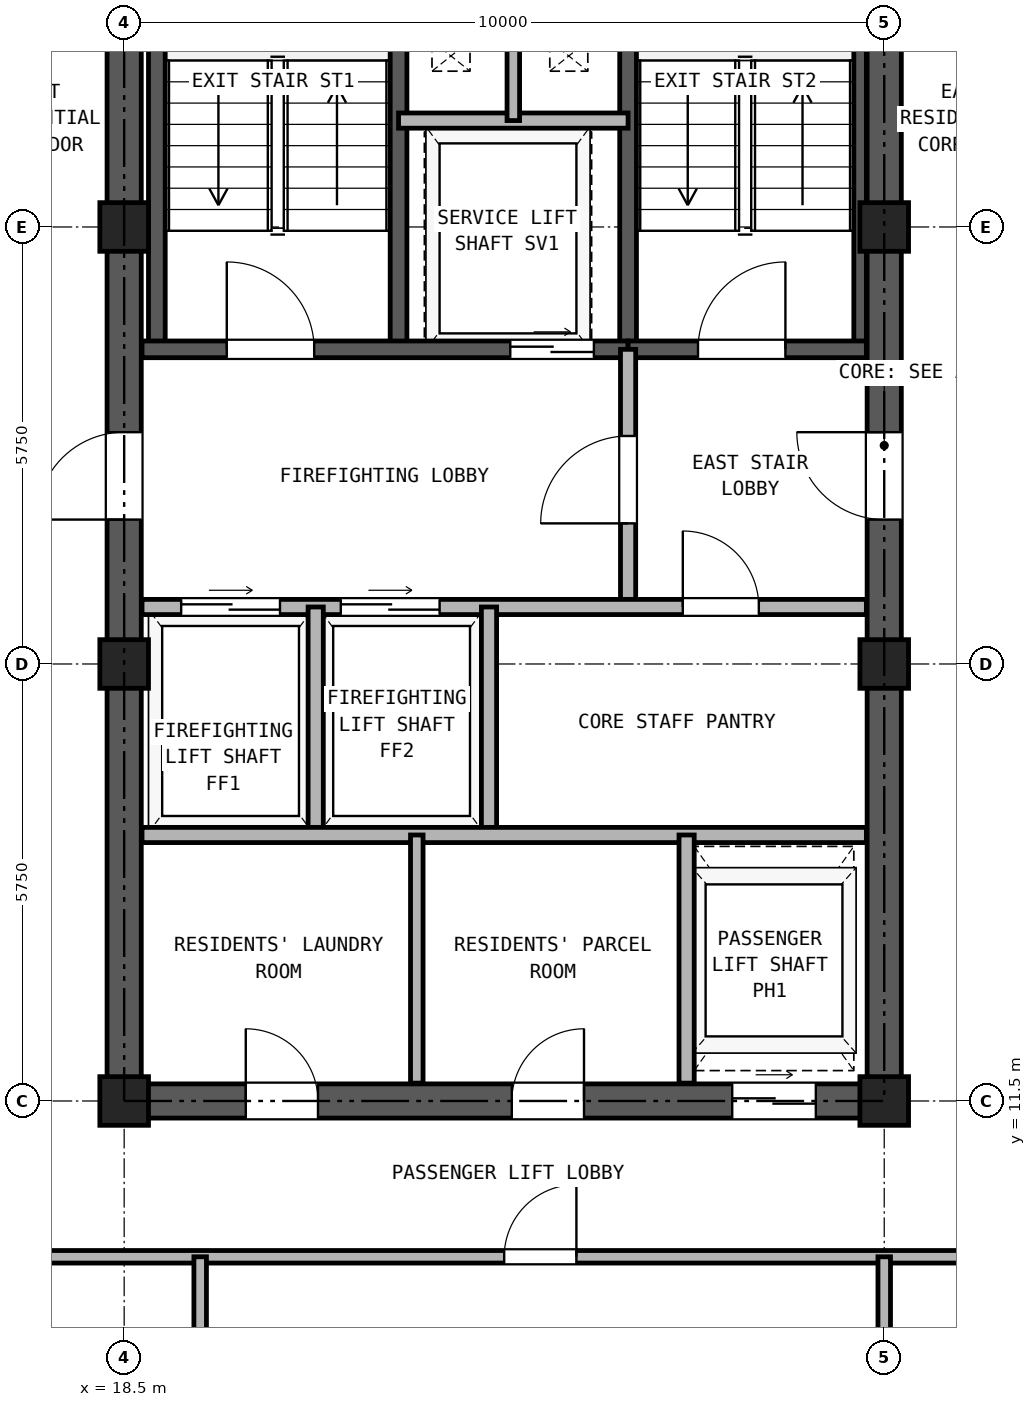
"""IFC4 building model, lengths in metres.
Left out: names, types, materials, properties, quantities, classifications, styles, units other than length and angle.
Written with IfcOpenShell. Run it as: python <this file> out.ifc"""

import sys

from ifc_helpers import new_model, si_unit, direction, frame, frame_2d, origin, origin_2d, place, context, subcontext, project, spatial, rectangle, hollow_rectangle, extrude, source, transform, mapped, element, fill, save


model = new_model("IFC4")
c1 = context("Model", 3, precision=1e-05, world=origin(), true_north=direction((0.0, 1.0)))
c2 = subcontext(c1, "Body", "Model", "MODEL_VIEW")
j1 = project(units=[si_unit("LENGTHUNIT", "METRE"), si_unit("PLANEANGLEUNIT", "RADIAN")], contexts=[c1])
p1 = place(None, origin())
s1 = spatial("IfcSite", under=j1, at=p1, CompositionType="ELEMENT")
p2 = place(p1, origin())
s2 = spatial("IfcBuilding", under=s1, at=p2, CompositionType="ELEMENT")
p3 = place(p2, frame((0.0, 0.0, 168.9)))
s3 = spatial("IfcBuildingStorey", under=s2, at=p3, CompositionType="ELEMENT", Elevation=168.9)
m1 = source(origin(), c2, "Body", "SweptSolid", [
    extrude(hollow_rectangle(XDim=0.64, YDim=0.64, WallThickness=0.035, at=origin_2d()), origin(), (0.0, 0.0, 1.0), 2.95),
])
for number, where, z_axis, x_axis in (
    (1, (18.5, 11.5, 0.0), (0.0, 0.0, 1.0), (1.0, 0.0, 0.0)),
    (2, (18.5, 17.25, 0.0), (0.0, 0.0, 1.0), (1.0, 0.0, 0.0)),
    (3, (18.5, 23.0, 0.0), (0.0, 0.0, 1.0), (1.0, 0.0, 0.0)),
    (4, (28.5, 11.5, 0.0), (0.0, 0.0, 1.0), (1.0, 0.0, 0.0)),
    (5, (28.5, 17.25, 0.0), (0.0, 0.0, 1.0), (1.0, 0.0, 0.0)),
    (6, (28.5, 23.0, 0.0), (0.0, 0.0, 1.0), (1.0, 0.0, 0.0)),
):
    element("IfcColumn", number, at=place(p3, frame(where, z_axis=z_axis, x_axis=x_axis)), inside=s3, PredefinedType="COLUMN", context=c2, shape_type="MappedRepresentation", body=[
        mapped(m1, transform((0.0, 0.0, 0.0), x_axis=(1.0, 0.0, 0.0), y_axis=(0.0, 1.0, 0.0), z_axis=(0.0, 0.0, 1.0), scale=1.0)),
    ])
p4 = place(p3, frame((18.275, 11.5, 0.0), z_axis=(0.0, 0.0, 1.0), x_axis=(1.0, 0.0, 0.0)))
e7 = element("IfcWall", 7, at=p4, inside=s3, PredefinedType="SHEAR", context=c2, shape_type="SweptSolid", body=[
    extrude(rectangle(XDim=10.45, YDim=0.45, at=frame_2d((5.225, 0.0))), origin(), (0.0, 0.0, 1.0), 2.95),
])
p5 = place(p4, frame((1.825, 0.0, 0.0)))
e8 = element("IfcOpeningElement", 8, at=p5, cuts=e7, PredefinedType="OPENING", context=c2, shape_type="SweptSolid", body=[
    extrude(rectangle(XDim=0.95, YDim=2.15, at=frame_2d((0.475, 1.075))), frame((0.0, 0.235, 0.0), z_axis=(0.0, -1.0, 0.0), x_axis=(1.0, 0.0, 0.0)), (0.0, 0.0, 1.0), 0.47),
])
p6 = place(p4, frame((5.325, 0.0, 0.0)))
e9 = element("IfcOpeningElement", 9, at=p6, cuts=e7, PredefinedType="OPENING", context=c2, shape_type="SweptSolid", body=[
    extrude(rectangle(XDim=0.95, YDim=2.15, at=frame_2d((0.475, 1.075))), frame((0.0, 0.235, 0.0), z_axis=(0.0, -1.0, 0.0), x_axis=(1.0, 0.0, 0.0)), (0.0, 0.0, 1.0), 0.47),
])
p7 = place(p4, frame((8.225, 0.0, 0.0)))
e10 = element("IfcOpeningElement", 10, at=p7, cuts=e7, PredefinedType="OPENING", context=c2, shape_type="SweptSolid", body=[
    extrude(rectangle(XDim=1.1, YDim=2.25, at=frame_2d((0.55, 1.125))), frame((0.0, 0.235, 0.0), z_axis=(0.0, -1.0, 0.0), x_axis=(1.0, 0.0, 0.0)), (0.0, 0.0, 1.0), 0.47),
])
p8 = place(p3, frame((18.5, 11.725, 0.0), z_axis=(0.0, 0.0, 1.0), x_axis=(0.0, 1.0, 0.0)))
e11 = element("IfcWall", 11, at=p8, inside=s3, PredefinedType="SHEAR", context=c2, shape_type="SweptSolid", body=[
    extrude(rectangle(XDim=16.8, YDim=0.45, at=frame_2d((8.4, 0.0))), origin(), (0.0, 0.0, 1.0), 2.95),
])
p9 = place(p8, frame((7.425, 0.0, 0.0)))
e12 = element("IfcOpeningElement", 12, at=p9, cuts=e11, PredefinedType="OPENING", context=c2, shape_type="SweptSolid", body=[
    extrude(rectangle(XDim=1.15, YDim=2.2, at=frame_2d((0.575, 1.1))), frame((0.0, 0.235, 0.0), z_axis=(0.0, -1.0, 0.0), x_axis=(1.0, 0.0, 0.0)), (0.0, 0.0, 1.0), 0.47),
])
p10 = place(p3, frame((28.5, 11.725, 0.0), z_axis=(0.0, 0.0, 1.0), x_axis=(0.0, 1.0, 0.0)))
e13 = element("IfcWall", 13, at=p10, inside=s3, PredefinedType="SHEAR", context=c2, shape_type="SweptSolid", body=[
    extrude(rectangle(XDim=16.8, YDim=0.45, at=frame_2d((8.4, 0.0))), origin(), (0.0, 0.0, 1.0), 2.95),
])
p11 = place(p10, frame((7.425, 0.0, 0.0)))
e14 = element("IfcOpeningElement", 14, at=p11, cuts=e13, PredefinedType="OPENING", context=c2, shape_type="SweptSolid", body=[
    extrude(rectangle(XDim=1.15, YDim=2.2, at=frame_2d((0.575, 1.1))), frame((0.0, 0.235, 0.0), z_axis=(0.0, -1.0, 0.0), x_axis=(1.0, 0.0, 0.0)), (0.0, 0.0, 1.0), 0.47),
])
for number, where, z_axis, x_axis in (
    (15, (18.93, 21.39, 0.0), (0.0, 0.0, 1.0), (0.0, 1.0, 0.0)),
    (16, (22.11, 21.39, 0.0), (0.0, 0.0, 1.0), (0.0, 1.0, 0.0)),
    (17, (25.13, 21.39, 0.0), (0.0, 0.0, 1.0), (0.0, 1.0, 0.0)),
):
    element("IfcWall", number, at=place(p3, frame(where, z_axis=z_axis, x_axis=x_axis)), inside=s3, PredefinedType="SOLIDWALL", context=c2, shape_type="SweptSolid", body=[
        extrude(rectangle(XDim=7.11, YDim=0.22, at=frame_2d((3.555, 0.0))), origin(), (0.0, 0.0, 1.0), 2.95),
    ])
p12 = place(p3, frame((28.183, 21.39, 0.0), z_axis=(0.0, 0.0, 1.0), x_axis=(0.0, 1.0, 0.0)))
e18 = element("IfcWall", 18, at=p12, inside=s3, PredefinedType="PARTITIONING", context=c2, shape_type="SweptSolid", body=[
    extrude(rectangle(XDim=6.945, YDim=0.165, at=frame_2d((3.473, 0.0))), origin(), (0.0, 0.0, 1.0), 2.95),
])
p13 = place(p3, frame((18.735, 21.39, 0.0), z_axis=(0.0, 0.0, 1.0), x_axis=(1.0, 0.0, 0.0)))
e19 = element("IfcWall", 19, at=p13, inside=s3, PredefinedType="SOLIDWALL", context=c2, shape_type="SweptSolid", body=[
    extrude(rectangle(XDim=6.395, YDim=0.22, at=frame_2d((3.197, 0.0))), origin(), (0.0, 0.0, 1.0), 2.95),
])
p14 = place(p13, frame((1.115, 0.0, 0.0)))
e20 = element("IfcOpeningElement", 20, at=p14, cuts=e19, PredefinedType="OPENING", context=c2, shape_type="SweptSolid", body=[
    extrude(rectangle(XDim=1.15, YDim=2.2, at=frame_2d((0.575, 1.1))), frame((0.0, 0.12, 0.0), z_axis=(0.0, -1.0, 0.0), x_axis=(1.0, 0.0, 0.0)), (0.0, 0.0, 1.0), 0.24),
])
p15 = place(p13, frame((4.845, 0.0, 0.0)))
e21 = element("IfcOpeningElement", 21, at=p15, cuts=e19, PredefinedType="OPENING", context=c2, shape_type="SweptSolid", body=[
    extrude(rectangle(XDim=1.1, YDim=2.25, at=frame_2d((0.55, 1.125))), frame((0.0, 0.12, 0.0), z_axis=(0.0, -1.0, 0.0), x_axis=(1.0, 0.0, 0.0)), (0.0, 0.0, 1.0), 0.24),
])
p16 = place(p3, frame((25.13, 21.39, 0.0), z_axis=(0.0, 0.0, 1.0), x_axis=(1.0, 0.0, 0.0)))
e22 = element("IfcWall", 22, at=p16, inside=s3, PredefinedType="SOLIDWALL", context=c2, shape_type="SweptSolid", body=[
    extrude(rectangle(XDim=3.135, YDim=0.22, at=frame_2d((1.567, 0.0))), origin(), (0.0, 0.0, 1.0), 2.95),
])
p17 = place(p16, frame((0.92, 0.0, 0.0)))
e23 = element("IfcOpeningElement", 23, at=p17, cuts=e22, PredefinedType="OPENING", context=c2, shape_type="SweptSolid", body=[
    extrude(rectangle(XDim=1.15, YDim=2.2, at=frame_2d((0.575, 1.1))), frame((0.0, 0.12, 0.0), z_axis=(0.0, -1.0, 0.0), x_axis=(1.0, 0.0, 0.0)), (0.0, 0.0, 1.0), 0.24),
])
p18 = place(p3, frame((22.11, 24.4, 0.0), z_axis=(0.0, 0.0, 1.0), x_axis=(1.0, 0.0, 0.0)))
e24 = element("IfcWall", 24, at=p18, inside=s3, PredefinedType="PARTITIONING", context=c2, shape_type="SweptSolid", body=[
    extrude(rectangle(XDim=3.02, YDim=0.2, at=frame_2d((1.51, 0.0))), origin(), (0.0, 0.0, 1.0), 2.95),
])
p19 = place(p3, frame((23.62, 24.4, 0.0), z_axis=(0.0, 0.0, 1.0), x_axis=(0.0, 1.0, 0.0)))
e25 = element("IfcWall", 25, at=p19, inside=s3, PredefinedType="PARTITIONING", context=c2, shape_type="SweptSolid", body=[
    extrude(rectangle(XDim=4.115, YDim=0.165, at=frame_2d((2.058, 0.0))), origin(), (0.0, 0.0, 1.0), 2.95),
])
p20 = place(p3, frame((25.13, 18.0, 0.0), z_axis=(0.0, 0.0, 1.0), x_axis=(0.0, 1.0, 0.0)))
e26 = element("IfcWall", 26, at=p20, inside=s3, PredefinedType="PARTITIONING", context=c2, shape_type="SweptSolid", body=[
    extrude(rectangle(XDim=3.39, YDim=0.2, at=frame_2d((1.695, 0.0))), origin(), (0.0, 0.0, 1.0), 2.95),
])
p21 = place(p20, frame((1.1, 0.0, 0.0)))
e27 = element("IfcOpeningElement", 27, at=p21, cuts=e26, PredefinedType="OPENING", context=c2, shape_type="SweptSolid", body=[
    extrude(rectangle(XDim=1.15, YDim=2.2, at=frame_2d((0.575, 1.1))), frame((0.0, 0.11, 0.0), z_axis=(0.0, -1.0, 0.0), x_axis=(1.0, 0.0, 0.0)), (0.0, 0.0, 1.0), 0.22),
])
p22 = place(p3, frame((18.735, 18.0, 0.0), z_axis=(0.0, 0.0, 1.0), x_axis=(1.0, 0.0, 0.0)))
e28 = element("IfcWall", 28, at=p22, inside=s3, PredefinedType="PARTITIONING", context=c2, shape_type="SweptSolid", body=[
    extrude(rectangle(XDim=9.53, YDim=0.2, at=frame_2d((4.765, 0.0))), origin(), (0.0, 0.0, 1.0), 2.95),
])
p23 = place(p22, frame((0.515, 0.0, 0.0)))
e29 = element("IfcOpeningElement", 29, at=p23, cuts=e28, PredefinedType="OPENING", context=c2, shape_type="SweptSolid", body=[
    extrude(rectangle(XDim=1.3, YDim=2.3, at=frame_2d((0.65, 1.15))), frame((0.0, 0.11, 0.0), z_axis=(0.0, -1.0, 0.0), x_axis=(1.0, 0.0, 0.0)), (0.0, 0.0, 1.0), 0.22),
])
p24 = place(p22, frame((2.615, 0.0, 0.0)))
e30 = element("IfcOpeningElement", 30, at=p24, cuts=e28, PredefinedType="OPENING", context=c2, shape_type="SweptSolid", body=[
    extrude(rectangle(XDim=1.3, YDim=2.3, at=frame_2d((0.65, 1.15))), frame((0.0, 0.11, 0.0), z_axis=(0.0, -1.0, 0.0), x_axis=(1.0, 0.0, 0.0)), (0.0, 0.0, 1.0), 0.22),
])
p25 = place(p22, frame((7.115, 0.0, 0.0)))
e31 = element("IfcOpeningElement", 31, at=p25, cuts=e28, PredefinedType="OPENING", context=c2, shape_type="SweptSolid", body=[
    extrude(rectangle(XDim=1.0, YDim=2.15, at=frame_2d((0.5, 1.075))), frame((0.0, 0.11, 0.0), z_axis=(0.0, -1.0, 0.0), x_axis=(1.0, 0.0, 0.0)), (0.0, 0.0, 1.0), 0.22),
])
for number, where, z_axis, x_axis in (
    (32, (21.02, 15.0, 0.0), (0.0, 0.0, 1.0), (0.0, 1.0, 0.0)),
    (33, (23.3, 15.0, 0.0), (0.0, 0.0, 1.0), (0.0, 1.0, 0.0)),
):
    element("IfcWall", number, at=place(p3, frame(where, z_axis=z_axis, x_axis=x_axis)), inside=s3, PredefinedType="PARTITIONING", context=c2, shape_type="SweptSolid", body=[
        extrude(rectangle(XDim=3.0, YDim=0.2, at=frame_2d((1.5, 0.0))), origin(), (0.0, 0.0, 1.0), 2.95),
    ])
p26 = place(p3, frame((18.735, 15.0, 0.0), z_axis=(0.0, 0.0, 1.0), x_axis=(1.0, 0.0, 0.0)))
e34 = element("IfcWall", 34, at=p26, inside=s3, PredefinedType="PARTITIONING", context=c2, shape_type="SweptSolid", body=[
    extrude(rectangle(XDim=9.53, YDim=0.2, at=frame_2d((4.765, 0.0))), origin(), (0.0, 0.0, 1.0), 2.95),
])
p27 = place(p3, frame((22.35, 11.735, 0.0), z_axis=(0.0, 0.0, 1.0), x_axis=(0.0, 1.0, 0.0)))
e35 = element("IfcWall", 35, at=p27, inside=s3, PredefinedType="PARTITIONING", context=c2, shape_type="SweptSolid", body=[
    extrude(rectangle(XDim=3.265, YDim=0.165, at=frame_2d((1.632, 0.0))), origin(), (0.0, 0.0, 1.0), 2.95),
])
p28 = place(p3, frame((25.9, 11.735, 0.0), z_axis=(0.0, 0.0, 1.0), x_axis=(0.0, 1.0, 0.0)))
e36 = element("IfcWall", 36, at=p28, inside=s3, PredefinedType="PARTITIONING", context=c2, shape_type="SweptSolid", body=[
    extrude(rectangle(XDim=3.265, YDim=0.2, at=frame_2d((1.632, 0.0))), origin(), (0.0, 0.0, 1.0), 2.95),
])
p29 = place(p3, frame((0.16, 9.45, 0.0), z_axis=(0.0, 0.0, 1.0), x_axis=(1.0, 0.0, 0.0)))
e37 = element("IfcWall", 37, at=p29, inside=s3, PredefinedType="PARTITIONING", context=c2, shape_type="SweptSolid", body=[
    extrude(rectangle(XDim=41.48, YDim=0.165, at=frame_2d((20.74, 0.0))), origin(), (0.0, 0.0, 1.0), 2.95),
])
p30 = place(p29, frame((12.89, 0.0, 0.0)))
e38 = element("IfcOpeningElement", 38, at=p30, cuts=e37, PredefinedType="OPENING", context=c2, shape_type="SweptSolid", body=[
    extrude(rectangle(XDim=0.95, YDim=2.15, at=frame_2d((0.475, 1.075))), frame((0.0, 0.093, 0.0), z_axis=(0.0, -1.0, 0.0), x_axis=(1.0, 0.0, 0.0)), (0.0, 0.0, 1.0), 0.185),
])
p31 = place(p29, frame((23.34, 0.0, 0.0)))
e39 = element("IfcOpeningElement", 39, at=p31, cuts=e37, PredefinedType="OPENING", context=c2, shape_type="SweptSolid", body=[
    extrude(rectangle(XDim=0.95, YDim=2.15, at=frame_2d((0.475, 1.075))), frame((0.0, 0.093, 0.0), z_axis=(0.0, -1.0, 0.0), x_axis=(1.0, 0.0, 0.0)), (0.0, 0.0, 1.0), 0.185),
])
p32 = place(p29, frame((30.34, 0.0, 0.0)))
e40 = element("IfcOpeningElement", 40, at=p32, cuts=e37, PredefinedType="OPENING", context=c2, shape_type="SweptSolid", body=[
    extrude(rectangle(XDim=0.95, YDim=2.15, at=frame_2d((0.475, 1.075))), frame((0.0, 0.093, 0.0), z_axis=(0.0, -1.0, 0.0), x_axis=(1.0, 0.0, 0.0)), (0.0, 0.0, 1.0), 0.185),
])
p33 = place(p29, frame((35.19, 0.0, 0.0)))
e41 = element("IfcOpeningElement", 41, at=p33, cuts=e37, PredefinedType="OPENING", context=c2, shape_type="SweptSolid", body=[
    extrude(rectangle(XDim=0.95, YDim=2.15, at=frame_2d((0.475, 1.075))), frame((0.0, 0.093, 0.0), z_axis=(0.0, -1.0, 0.0), x_axis=(1.0, 0.0, 0.0)), (0.0, 0.0, 1.0), 0.185),
])
p34 = place(p3, frame((19.5, 0.16, 0.0), z_axis=(0.0, 0.0, 1.0), x_axis=(0.0, 1.0, 0.0)))
e42 = element("IfcWall", 42, at=p34, inside=s3, PredefinedType="PARTITIONING", context=c2, shape_type="SweptSolid", body=[
    extrude(rectangle(XDim=9.29, YDim=0.165, at=frame_2d((4.645, 0.0))), origin(), (0.0, 0.0, 1.0), 2.95),
])
p35 = place(p3, frame((28.5, 0.16, 0.0), z_axis=(0.0, 0.0, 1.0), x_axis=(0.0, 1.0, 0.0)))
e43 = element("IfcWall", 43, at=p35, inside=s3, PredefinedType="PARTITIONING", context=c2, shape_type="SweptSolid", body=[
    extrude(rectangle(XDim=9.29, YDim=0.165, at=frame_2d((4.645, 0.0))), origin(), (0.0, 0.0, 1.0), 2.323),
])
p36 = place(p14, frame((1.15, 0.0, 0.0), z_axis=(0.0, 0.0, 1.0), x_axis=(-1.0, 0.0, 0.0)))
e44 = element("IfcDoor", 44, at=p36, inside=s3, OperationType="SINGLE_SWING_LEFT", PredefinedType="DOOR", context=c2, shape_type="SweptSolid", body=[
    extrude(rectangle(XDim=1.15, YDim=2.2, at=frame_2d((0.575, 1.1))), frame((0.0, 0.025, 0.0), z_axis=(0.0, -1.0, 0.0), x_axis=(1.0, 0.0, 0.0)), (0.0, 0.0, 1.0), 0.05),
])
fill(e20, e44)
p37 = place(p17, frame((1.15, 0.0, 0.0), z_axis=(0.0, 0.0, 1.0), x_axis=(-1.0, 0.0, 0.0)))
e45 = element("IfcDoor", 45, at=p37, inside=s3, OperationType="SINGLE_SWING_RIGHT", PredefinedType="DOOR", context=c2, shape_type="SweptSolid", body=[
    extrude(rectangle(XDim=1.15, YDim=2.2, at=frame_2d((0.575, 1.1))), frame((0.0, 0.025, 0.0), z_axis=(0.0, -1.0, 0.0), x_axis=(1.0, 0.0, 0.0)), (0.0, 0.0, 1.0), 0.05),
])
fill(e23, e45)
p38 = place(p15, frame((1.1, 0.0, 0.0), z_axis=(0.0, 0.0, 1.0), x_axis=(-1.0, 0.0, 0.0)))
e46 = element("IfcDoor", 46, at=p38, inside=s3, OperationType="DOUBLE_DOOR_SLIDING", PredefinedType="DOOR", context=c2, shape_type="SweptSolid", body=[
    extrude(rectangle(XDim=1.1, YDim=2.25, at=frame_2d((0.55, 1.125))), frame((0.0, 0.025, 0.0), z_axis=(0.0, -1.0, 0.0), x_axis=(1.0, 0.0, 0.0)), (0.0, 0.0, 1.0), 0.05),
])
fill(e21, e46)
p39 = place(p21, origin())
e47 = element("IfcDoor", 47, at=p39, inside=s3, OperationType="SINGLE_SWING_LEFT", PredefinedType="DOOR", context=c2, shape_type="SweptSolid", body=[
    extrude(rectangle(XDim=1.15, YDim=2.2, at=frame_2d((0.575, 1.1))), frame((0.0, 0.025, 0.0), z_axis=(0.0, -1.0, 0.0), x_axis=(1.0, 0.0, 0.0)), (0.0, 0.0, 1.0), 0.05),
])
fill(e27, e47)
p40 = place(p23, origin())
e48 = element("IfcDoor", 48, at=p40, inside=s3, OperationType="DOUBLE_DOOR_SLIDING", PredefinedType="DOOR", context=c2, shape_type="SweptSolid", body=[
    extrude(rectangle(XDim=1.3, YDim=2.3, at=frame_2d((0.65, 1.15))), frame((0.0, 0.025, 0.0), z_axis=(0.0, -1.0, 0.0), x_axis=(1.0, 0.0, 0.0)), (0.0, 0.0, 1.0), 0.05),
])
fill(e29, e48)
p41 = place(p24, origin())
e49 = element("IfcDoor", 49, at=p41, inside=s3, OperationType="DOUBLE_DOOR_SLIDING", PredefinedType="DOOR", context=c2, shape_type="SweptSolid", body=[
    extrude(rectangle(XDim=1.3, YDim=2.3, at=frame_2d((0.65, 1.15))), frame((0.0, 0.025, 0.0), z_axis=(0.0, -1.0, 0.0), x_axis=(1.0, 0.0, 0.0)), (0.0, 0.0, 1.0), 0.05),
])
fill(e30, e49)
p42 = place(p25, frame((1.0, 0.0, 0.0), z_axis=(0.0, 0.0, 1.0), x_axis=(-1.0, 0.0, 0.0)))
e50 = element("IfcDoor", 50, at=p42, inside=s3, OperationType="SINGLE_SWING_LEFT", PredefinedType="DOOR", context=c2, shape_type="SweptSolid", body=[
    extrude(rectangle(XDim=1.0, YDim=2.15, at=frame_2d((0.5, 1.075))), frame((0.0, 0.025, 0.0), z_axis=(0.0, -1.0, 0.0), x_axis=(1.0, 0.0, 0.0)), (0.0, 0.0, 1.0), 0.05),
])
fill(e31, e50)
p43 = place(p9, frame((1.15, 0.0, 0.0), z_axis=(0.0, 0.0, 1.0), x_axis=(-1.0, 0.0, 0.0)))
e51 = element("IfcDoor", 51, at=p43, inside=s3, OperationType="SINGLE_SWING_LEFT", PredefinedType="DOOR", context=c2, shape_type="SweptSolid", body=[
    extrude(rectangle(XDim=1.15, YDim=2.2, at=frame_2d((0.575, 1.1))), frame((0.0, 0.025, 0.0), z_axis=(0.0, -1.0, 0.0), x_axis=(1.0, 0.0, 0.0)), (0.0, 0.0, 1.0), 0.05),
])
fill(e12, e51)
p44 = place(p11, origin())
e52 = element("IfcDoor", 52, at=p44, inside=s3, OperationType="SINGLE_SWING_RIGHT", PredefinedType="DOOR", context=c2, shape_type="SweptSolid", body=[
    extrude(rectangle(XDim=1.15, YDim=2.2, at=frame_2d((0.575, 1.1))), frame((0.0, 0.025, 0.0), z_axis=(0.0, -1.0, 0.0), x_axis=(1.0, 0.0, 0.0)), (0.0, 0.0, 1.0), 0.05),
])
fill(e14, e52)
p45 = place(p5, frame((0.95, 0.0, 0.0), z_axis=(0.0, 0.0, 1.0), x_axis=(-1.0, 0.0, 0.0)))
e53 = element("IfcDoor", 53, at=p45, inside=s3, OperationType="SINGLE_SWING_LEFT", PredefinedType="DOOR", context=c2, shape_type="SweptSolid", body=[
    extrude(rectangle(XDim=0.95, YDim=2.15, at=frame_2d((0.475, 1.075))), frame((0.0, 0.025, 0.0), z_axis=(0.0, -1.0, 0.0), x_axis=(1.0, 0.0, 0.0)), (0.0, 0.0, 1.0), 0.05),
])
fill(e8, e53)
p46 = place(p6, frame((0.95, 0.0, 0.0), z_axis=(0.0, 0.0, 1.0), x_axis=(-1.0, 0.0, 0.0)))
e54 = element("IfcDoor", 54, at=p46, inside=s3, OperationType="SINGLE_SWING_RIGHT", PredefinedType="DOOR", context=c2, shape_type="SweptSolid", body=[
    extrude(rectangle(XDim=0.95, YDim=2.15, at=frame_2d((0.475, 1.075))), frame((0.0, 0.025, 0.0), z_axis=(0.0, -1.0, 0.0), x_axis=(1.0, 0.0, 0.0)), (0.0, 0.0, 1.0), 0.05),
])
fill(e9, e54)
p47 = place(p7, frame((1.1, 0.0, 0.0), z_axis=(0.0, 0.0, 1.0), x_axis=(-1.0, 0.0, 0.0)))
e55 = element("IfcDoor", 55, at=p47, inside=s3, OperationType="DOUBLE_DOOR_SLIDING", PredefinedType="DOOR", context=c2, shape_type="SweptSolid", body=[
    extrude(rectangle(XDim=1.1, YDim=2.25, at=frame_2d((0.55, 1.125))), frame((0.0, 0.025, 0.0), z_axis=(0.0, -1.0, 0.0), x_axis=(1.0, 0.0, 0.0)), (0.0, 0.0, 1.0), 0.05),
])
fill(e10, e55)
p48 = place(p31, frame((0.95, 0.0, 0.0), z_axis=(0.0, 0.0, 1.0), x_axis=(-1.0, 0.0, 0.0)))
e56 = element("IfcDoor", 56, at=p48, inside=s3, OperationType="SINGLE_SWING_RIGHT", PredefinedType="DOOR", context=c2, shape_type="SweptSolid", body=[
    extrude(rectangle(XDim=0.95, YDim=2.15, at=frame_2d((0.475, 1.075))), frame((0.0, 0.025, 0.0), z_axis=(0.0, -1.0, 0.0), x_axis=(1.0, 0.0, 0.0)), (0.0, 0.0, 1.0), 0.05),
])
fill(e39, e56)
save(model, sys.argv[1])
